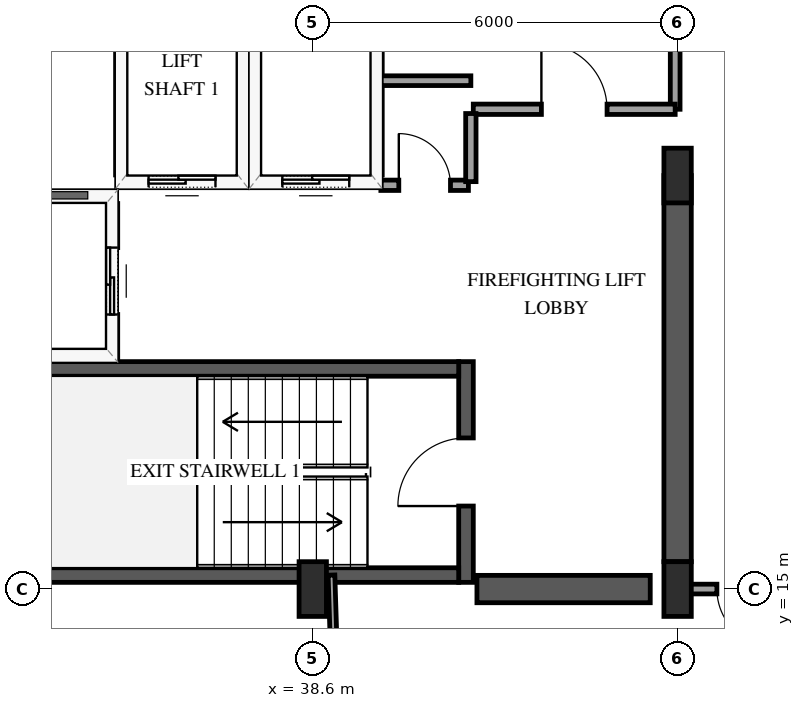
"""IFC4 building model, lengths in metres.
Left out: names, types, materials, properties, quantities, classifications, styles, units other than length and angle.
Written with IfcOpenShell. Run it as: python <this file> out.ifc"""

import sys

from ifc_helpers import new_model, si_unit, direction, frame, frame_2d, origin, origin_2d, place, context, subcontext, project, spatial, rectangle, extrude, element, fill, save


model = new_model("IFC4")
c1 = context("Model", 3, precision=1e-05, world=origin(), true_north=direction((0.0, 1.0)))
c2 = subcontext(c1, "Body", "Model", "MODEL_VIEW")
j1 = project(units=[si_unit("LENGTHUNIT", "METRE"), si_unit("PLANEANGLEUNIT", "RADIAN")], contexts=[c1])
p1 = place(None, origin())
s1 = spatial("IfcSite", under=j1, at=p1, CompositionType="ELEMENT")
p2 = place(p1, origin())
s2 = spatial("IfcBuilding", under=s1, at=p2, CompositionType="ELEMENT")
p3 = place(p2, frame((0.0, 0.0, 253.75)))
s3 = spatial("IfcBuildingStorey", under=s2, at=p3, CompositionType="ELEMENT", Elevation=253.75)
p4 = place(p3, frame((41.12, 15.11, 0.0), z_axis=(0.0, 0.0, 1.0), x_axis=(0.0, 1.0, 0.0)))
e1 = element("IfcWall", 1, at=p4, inside=s3, PredefinedType="SHEAR", context=c2, shape_type="SweptSolid", body=[
    extrude(rectangle(XDim=3.63, YDim=0.24, at=frame_2d((1.815, 0.0))), origin(), (0.0, 0.0, 1.0), 3.75),
])
p5 = place(p4, frame((1.255, 0.0, 0.0)))
e2 = element("IfcOpeningElement", 2, at=p5, cuts=e1, PredefinedType="OPENING", context=c2, shape_type="SweptSolid", body=[
    extrude(rectangle(XDim=1.12, YDim=2.15, at=frame_2d((0.56, 1.075))), frame((0.0, 0.13, 0.0), z_axis=(0.0, -1.0, 0.0), x_axis=(1.0, 0.0, 0.0)), (0.0, 0.0, 1.0), 0.26),
])
for number, where, z_axis, x_axis in (
    (3, (33.0, 15.23, 0.0), (0.0, 0.0, 1.0), (1.0, 0.0, 0.0)),
    (4, (33.0, 18.62, 0.0), (0.0, 0.0, 1.0), (1.0, 0.0, 0.0)),
):
    element("IfcWall", number, at=place(p3, frame(where, z_axis=z_axis, x_axis=x_axis)), inside=s3, PredefinedType="SHEAR", context=c2, shape_type="SweptSolid", body=[
        extrude(rectangle(XDim=8.0, YDim=0.24, at=frame_2d((4.0, 0.0))), origin(), (0.0, 0.0, 1.0), 3.75),
    ])
p6 = place(p3, frame((41.3, 15.0, 0.0), z_axis=(0.0, 0.0, 1.0), x_axis=(1.0, 0.0, 0.0)))
e5 = element("IfcWall", 5, at=p6, inside=s3, PredefinedType="SHEAR", context=c2, shape_type="SweptSolid", body=[
    extrude(rectangle(XDim=2.85, YDim=0.45, at=frame_2d((1.425, 0.0))), origin(), (0.0, 0.0, 1.0), 3.75),
])
p7 = place(p3, frame((44.6, 15.45, 0.0), z_axis=(0.0, 0.0, 1.0), x_axis=(0.0, 1.0, 0.0)))
e6 = element("IfcWall", 6, at=p7, inside=s3, PredefinedType="SHEAR", context=c2, shape_type="SweptSolid", body=[
    extrude(rectangle(XDim=6.35, YDim=0.45, at=frame_2d((3.175, 0.0))), origin(), (0.0, 0.0, 1.0), 3.75),
])
for number, where, z_axis, x_axis in (
    (7, (38.6, 15.0, 0.0), (0.0, 0.0, 1.0), (1.0, 0.0, 0.0)),
    (8, (44.6, 15.0, 0.0), (0.0, 0.0, 1.0), (1.0, 0.0, 0.0)),
    (9, (44.6, 21.8, 0.0), (0.0, 0.0, 1.0), (1.0, 0.0, 0.0)),
):
    element("IfcColumn", number, at=place(p3, frame(where, z_axis=z_axis, x_axis=x_axis)), inside=s3, PredefinedType="PILASTER", context=c2, shape_type="SweptSolid", body=[
        extrude(rectangle(XDim=0.45, YDim=0.9, at=origin_2d()), origin(), (0.0, 0.0, 1.0), 3.75),
    ])
p8 = place(p3, frame((35.45, 21.7, 0.0), z_axis=(0.0, 0.0, 1.0), x_axis=(1.0, 0.0, 0.0)))
e10 = element("IfcWall", 10, at=p8, inside=s3, PredefinedType="SOLIDWALL", context=c2, shape_type="SweptSolid", body=[
    extrude(rectangle(XDim=2.0, YDim=0.185, at=frame_2d((1.0, 0.0))), origin(), (0.0, 0.0, 1.0), 2.824),
])
p9 = place(p8, frame((0.45, 0.0, 0.0)))
e11 = element("IfcOpeningElement", 11, at=p9, cuts=e10, PredefinedType="OPENING", context=c2, shape_type="SweptSolid", body=[
    extrude(rectangle(XDim=1.1, YDim=2.15, at=frame_2d((0.55, 1.075))), frame((0.0, 0.103, 0.0), z_axis=(0.0, -1.0, 0.0), x_axis=(1.0, 0.0, 0.0)), (0.0, 0.0, 1.0), 0.205),
])
for number, where, z_axis, x_axis in (
    (12, (35.45, 21.81, 0.0), (0.0, 0.0, 1.0), (0.0, 1.0, 0.0)),
    (13, (37.45, 21.81, 0.0), (0.0, 0.0, 1.0), (0.0, 1.0, 0.0)),
):
    element("IfcWall", number, at=place(p3, frame(where, z_axis=z_axis, x_axis=x_axis)), inside=s3, PredefinedType="SOLIDWALL", context=c2, shape_type="SweptSolid", body=[
        extrude(rectangle(XDim=2.38, YDim=0.185, at=frame_2d((1.19, 0.0))), origin(), (0.0, 0.0, 1.0), 3.45),
    ])
p10 = place(p3, frame((37.65, 21.7, 0.0), z_axis=(0.0, 0.0, 1.0), x_axis=(1.0, 0.0, 0.0)))
e14 = element("IfcWall", 14, at=p10, inside=s3, PredefinedType="SOLIDWALL", context=c2, shape_type="SweptSolid", body=[
    extrude(rectangle(XDim=2.0, YDim=0.185, at=frame_2d((1.0, 0.0))), origin(), (0.0, 0.0, 1.0), 2.824),
])
p11 = place(p10, frame((0.45, 0.0, 0.0)))
e15 = element("IfcOpeningElement", 15, at=p11, cuts=e14, PredefinedType="OPENING", context=c2, shape_type="SweptSolid", body=[
    extrude(rectangle(XDim=1.1, YDim=2.15, at=frame_2d((0.55, 1.075))), frame((0.0, 0.103, 0.0), z_axis=(0.0, -1.0, 0.0), x_axis=(1.0, 0.0, 0.0)), (0.0, 0.0, 1.0), 0.205),
])
p12 = place(p3, frame((39.65, 21.81, 0.0), z_axis=(0.0, 0.0, 1.0), x_axis=(0.0, 1.0, 0.0)))
e16 = element("IfcWall", 16, at=p12, inside=s3, PredefinedType="SOLIDWALL", context=c2, shape_type="SweptSolid", body=[
    extrude(rectangle(XDim=2.38, YDim=0.185, at=frame_2d((1.19, 0.0))), origin(), (0.0, 0.0, 1.0), 3.45),
])
p13 = place(p3, frame((32.72, 21.45, 0.0), z_axis=(0.0, 0.0, 1.0), x_axis=(1.0, 0.0, 0.0)))
e17 = element("IfcWall", 17, at=p13, inside=s3, PredefinedType="SOLIDWALL", context=c2, shape_type="SweptSolid", body=[
    extrude(rectangle(XDim=2.58, YDim=0.185, at=frame_2d((1.29, 0.0))), origin(), (0.0, 0.0, 1.0), 2.824),
])
p14 = place(p3, frame((35.3, 18.79, 0.0), z_axis=(0.0, 0.0, 1.0), x_axis=(0.0, 1.0, 0.0)))
e18 = element("IfcWall", 18, at=p14, inside=s3, PredefinedType="SOLIDWALL", context=c2, shape_type="SweptSolid", body=[
    extrude(rectangle(XDim=2.55, YDim=0.185, at=frame_2d((1.275, 0.0))), origin(), (0.0, 0.0, 1.0), 3.45),
])
p15 = place(p14, frame((0.725, 0.0, 0.0)))
e19 = element("IfcOpeningElement", 19, at=p15, cuts=e18, PredefinedType="OPENING", context=c2, shape_type="SweptSolid", body=[
    extrude(rectangle(XDim=1.1, YDim=2.15, at=frame_2d((0.55, 1.075))), frame((0.0, 0.103, 0.0), z_axis=(0.0, -1.0, 0.0), x_axis=(1.0, 0.0, 0.0)), (0.0, 0.0, 1.0), 0.205),
])
p16 = place(p3, frame((38.908, 15.23, 0.0), z_axis=(0.0, 0.0, 1.0), x_axis=(0.031618275785, -0.999500017327, 0.0)))
e20 = element("IfcWall", 20, at=p16, inside=s3, PredefinedType="PARTITIONING", context=c2, shape_type="SweptSolid", body=[
    extrude(rectangle(XDim=7.274, YDim=0.11, at=frame_2d((3.637, 0.0))), origin(), (0.0, 0.0, 1.0), 3.45),
])
p17 = place(p3, frame((44.56, 29.8, 0.0), z_axis=(0.0, 0.0, 1.0), x_axis=(0.0, -1.0, 0.0)))
e21 = element("IfcWall", 21, at=p17, inside=s3, PredefinedType="PARTITIONING", context=c2, shape_type="SweptSolid", body=[
    extrude(rectangle(XDim=6.91, YDim=0.16, at=frame_2d((3.455, 0.0))), origin(), (0.0, 0.0, 1.0), 2.49),
])
p18 = place(p17, frame((2.915, 0.0, 0.0)))
e22 = element("IfcOpeningElement", 22, at=p18, cuts=e21, PredefinedType="OPENING", context=c2, shape_type="SweptSolid", body=[
    extrude(rectangle(XDim=1.08, YDim=2.15, at=frame_2d((0.54, 1.075))), frame((0.0, 0.09, 0.0), z_axis=(0.0, -1.0, 0.0), x_axis=(1.0, 0.0, 0.0)), (0.0, 0.0, 1.0), 0.18),
])
p19 = place(p3, frame((41.24, 22.89, 0.0), z_axis=(0.0, 0.0, 1.0), x_axis=(1.0, 0.0, 0.0)))
e23 = element("IfcWall", 23, at=p19, inside=s3, PredefinedType="PARTITIONING", context=c2, shape_type="SweptSolid", body=[
    extrude(rectangle(XDim=3.32, YDim=0.17, at=frame_2d((1.66, 0.0))), origin(), (0.0, 0.0, 1.0), 3.45),
])
p20 = place(p19, frame((1.12, 0.0, 0.0)))
e24 = element("IfcOpeningElement", 24, at=p20, cuts=e23, PredefinedType="OPENING", context=c2, shape_type="SweptSolid", body=[
    extrude(rectangle(XDim=1.08, YDim=2.15, at=frame_2d((0.54, 1.075))), frame((0.0, 0.095, 0.0), z_axis=(0.0, -1.0, 0.0), x_axis=(1.0, 0.0, 0.0)), (0.0, 0.0, 1.0), 0.19),
])
p21 = place(p3, frame((46.58, 15.0, 0.0), z_axis=(0.0, 0.0, 1.0), x_axis=(-1.0, 0.0, 0.0)))
e25 = element("IfcWall", 25, at=p21, inside=s3, PredefinedType="PARTITIONING", context=c2, shape_type="SweptSolid", body=[
    extrude(rectangle(XDim=1.91, YDim=0.16, at=frame_2d((0.955, 0.0))), origin(), (0.0, 0.0, 1.0), 3.45),
])
p22 = place(p21, frame((0.384, 0.0, 0.0)))
e26 = element("IfcOpeningElement", 26, at=p22, cuts=e25, PredefinedType="OPENING", context=c2, shape_type="SweptSolid", body=[
    extrude(rectangle(XDim=0.95, YDim=2.15, at=frame_2d((0.475, 1.075))), frame((0.0, 0.09, 0.0), z_axis=(0.0, -1.0, 0.0), x_axis=(1.0, 0.0, 0.0)), (0.0, 0.0, 1.0), 0.18),
])
p23 = place(p3, frame((39.72, 21.64, 0.0), z_axis=(0.0, 0.0, 1.0), x_axis=(1.0, 0.0, 0.0)))
e27 = element("IfcWall", 27, at=p23, inside=s3, PredefinedType="PARTITIONING", context=c2, shape_type="SweptSolid", body=[
    extrude(rectangle(XDim=1.44, YDim=0.17, at=frame_2d((0.72, 0.0))), origin(), (0.0, 0.0, 1.0), 2.824),
])
p24 = place(p23, frame((0.295, 0.0, 0.0)))
e28 = element("IfcOpeningElement", 28, at=p24, cuts=e27, PredefinedType="OPENING", context=c2, shape_type="SweptSolid", body=[
    extrude(rectangle(XDim=0.85, YDim=2.1, at=frame_2d((0.425, 1.05))), frame((0.0, 0.095, 0.0), z_axis=(0.0, -1.0, 0.0), x_axis=(1.0, 0.0, 0.0)), (0.0, 0.0, 1.0), 0.19),
])
p25 = place(p3, frame((41.2, 21.7, 0.0), z_axis=(0.0, 0.0, 1.0), x_axis=(0.0, 1.0, 0.0)))
e29 = element("IfcWall", 29, at=p25, inside=s3, PredefinedType="PARTITIONING", context=c2, shape_type="SweptSolid", body=[
    extrude(rectangle(XDim=1.12, YDim=0.17, at=frame_2d((0.56, 0.0))), origin(), (0.0, 0.0, 1.0), 3.45),
])
p26 = place(p3, frame((41.2, 23.36, 0.0), z_axis=(0.0, 0.0, 1.0), x_axis=(-1.0, 0.0, 0.0)))
e30 = element("IfcWall", 30, at=p26, inside=s3, PredefinedType="PARTITIONING", context=c2, shape_type="SweptSolid", body=[
    extrude(rectangle(XDim=1.48, YDim=0.16, at=frame_2d((0.74, 0.0))), origin(), (0.0, 0.0, 1.0), 3.45),
])
p27 = place(p9, origin())
e31 = element("IfcDoor", 31, at=p27, inside=s3, OperationType="SLIDING_TO_LEFT", PredefinedType="DOOR", context=c2, shape_type="SweptSolid", body=[
    extrude(rectangle(XDim=1.1, YDim=2.15, at=frame_2d((0.55, 1.075))), frame((0.0, 0.025, 0.0), z_axis=(0.0, -1.0, 0.0), x_axis=(1.0, 0.0, 0.0)), (0.0, 0.0, 1.0), 0.05),
])
fill(e11, e31)
p28 = place(p11, origin())
e32 = element("IfcDoor", 32, at=p28, inside=s3, OperationType="SLIDING_TO_LEFT", PredefinedType="DOOR", context=c2, shape_type="SweptSolid", body=[
    extrude(rectangle(XDim=1.1, YDim=2.15, at=frame_2d((0.55, 1.075))), frame((0.0, 0.025, 0.0), z_axis=(0.0, -1.0, 0.0), x_axis=(1.0, 0.0, 0.0)), (0.0, 0.0, 1.0), 0.05),
])
fill(e15, e32)
p29 = place(p15, origin())
e33 = element("IfcDoor", 33, at=p29, inside=s3, OperationType="SLIDING_TO_LEFT", PredefinedType="DOOR", context=c2, shape_type="SweptSolid", body=[
    extrude(rectangle(XDim=1.1, YDim=2.15, at=frame_2d((0.55, 1.075))), frame((0.0, 0.025, 0.0), z_axis=(0.0, -1.0, 0.0), x_axis=(1.0, 0.0, 0.0)), (0.0, 0.0, 1.0), 0.05),
])
fill(e19, e33)
p30 = place(p5, origin())
e34 = element("IfcDoor", 34, at=p30, inside=s3, OperationType="SINGLE_SWING_LEFT", PredefinedType="DOOR", context=c2, shape_type="SweptSolid", body=[
    extrude(rectangle(XDim=1.12, YDim=2.15, at=frame_2d((0.56, 1.075))), frame((0.0, 0.025, 0.0), z_axis=(0.0, -1.0, 0.0), x_axis=(1.0, 0.0, 0.0)), (0.0, 0.0, 1.0), 0.05),
])
fill(e2, e34)
p31 = place(p20, origin())
e35 = element("IfcDoor", 35, at=p31, inside=s3, OperationType="SINGLE_SWING_LEFT", PredefinedType="DOOR", context=c2, shape_type="SweptSolid", body=[
    extrude(rectangle(XDim=1.08, YDim=2.15, at=frame_2d((0.54, 1.075))), frame((0.0, 0.025, 0.0), z_axis=(0.0, -1.0, 0.0), x_axis=(1.0, 0.0, 0.0)), (0.0, 0.0, 1.0), 0.05),
])
fill(e24, e35)
p32 = place(p22, origin())
e36 = element("IfcDoor", 36, at=p32, inside=s3, OperationType="SINGLE_SWING_LEFT", PredefinedType="DOOR", context=c2, shape_type="SweptSolid", body=[
    extrude(rectangle(XDim=0.95, YDim=2.15, at=frame_2d((0.475, 1.075))), frame((0.0, 0.025, 0.0), z_axis=(0.0, -1.0, 0.0), x_axis=(1.0, 0.0, 0.0)), (0.0, 0.0, 1.0), 0.05),
])
fill(e26, e36)
p33 = place(p24, origin())
e37 = element("IfcDoor", 37, at=p33, inside=s3, OperationType="SINGLE_SWING_LEFT", PredefinedType="DOOR", context=c2, shape_type="SweptSolid", body=[
    extrude(rectangle(XDim=0.85, YDim=2.1, at=frame_2d((0.425, 1.05))), frame((0.0, 0.025, 0.0), z_axis=(0.0, -1.0, 0.0), x_axis=(1.0, 0.0, 0.0)), (0.0, 0.0, 1.0), 0.05),
])
fill(e28, e37)
save(model, sys.argv[1])
